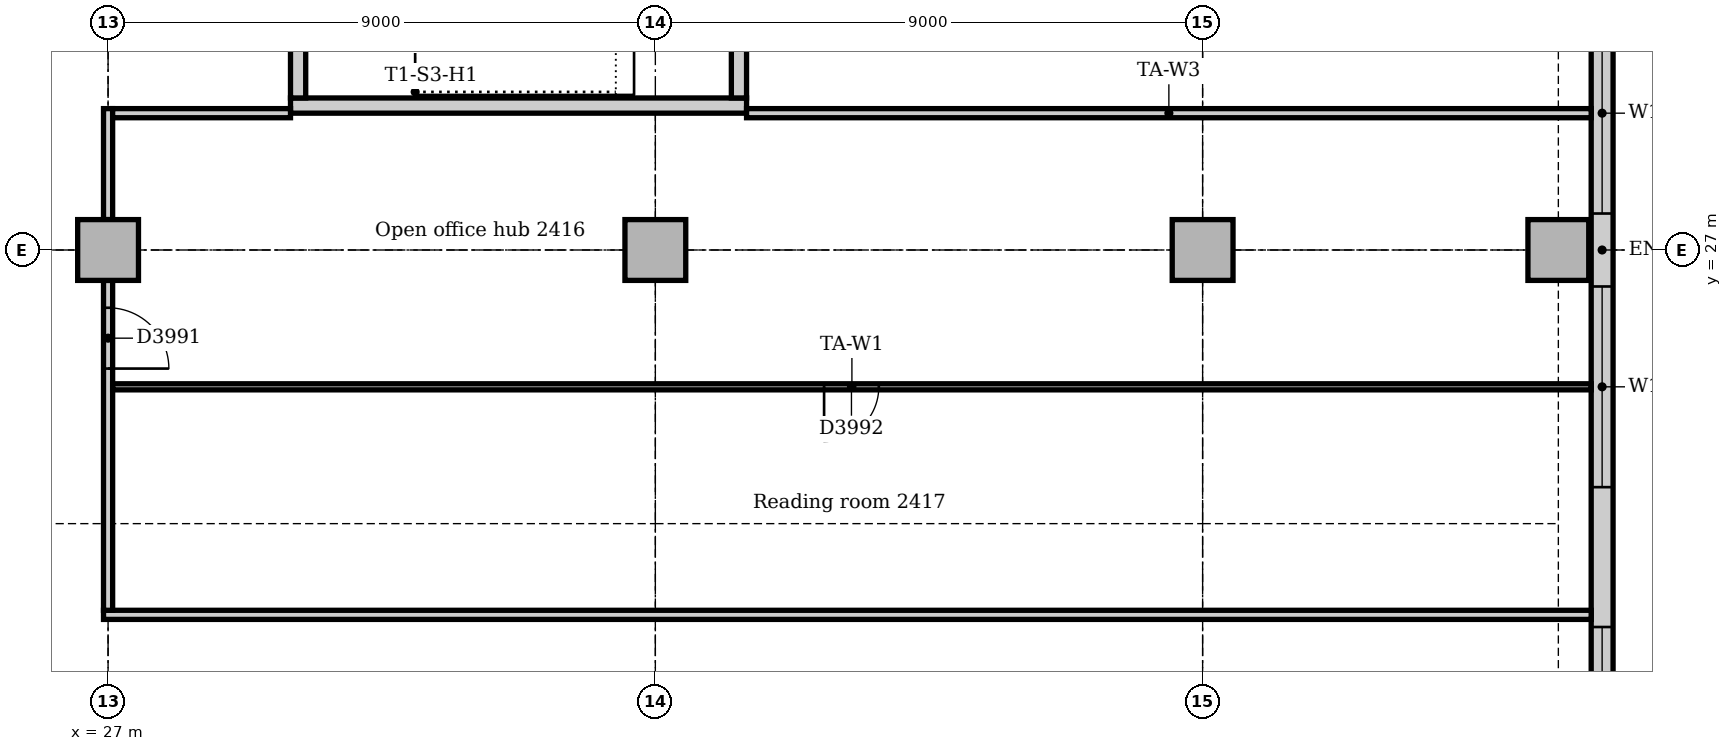
"""IFC4 building model, lengths in metres.
Left out: names, types, materials, properties, quantities, classifications, styles, units other than length and angle.
Written with IfcOpenShell. Run it as: python <this file> out.ifc"""

import sys

from ifc_helpers import new_model, si_unit, direction, frame, frame_2d, origin, origin_2d, place, context, subcontext, project, spatial, rectangle, extrude, element, fill, save


model = new_model("IFC4")
c1 = context("Model", 3, precision=1e-05, world=origin(), true_north=direction((0.0, 1.0)))
c2 = subcontext(c1, "Body", "Model", "MODEL_VIEW")
j1 = project(units=[si_unit("LENGTHUNIT", "METRE"), si_unit("PLANEANGLEUNIT", "RADIAN")], contexts=[c1])
p1 = place(None, origin())
s1 = spatial("IfcSite", under=j1, at=p1, CompositionType="ELEMENT")
p2 = place(p1, origin())
s2 = spatial("IfcBuilding", under=s1, at=p2, CompositionType="ELEMENT")
p3 = place(p2, frame((0.0, 0.0, 104.0)))
s3 = spatial("IfcBuildingStorey", under=s2, at=p3, CompositionType="ELEMENT", Elevation=104.0)
p4 = place(p3, frame((30.0, 29.375, 0.0), z_axis=(0.0, 0.0, 1.0), x_axis=(1.0, 0.0, 0.0)))
e1 = element("IfcWall", 1, at=p4, inside=s3, PredefinedType="SOLIDWALL", context=c2, shape_type="SweptSolid", body=[
    extrude(rectangle(XDim=7.5, YDim=0.25, at=frame_2d((3.75, 0.0))), origin(), (0.0, 0.0, 1.0), 4.0),
])
p5 = place(p3, frame((37.375, 29.5, 0.0), z_axis=(0.0, 0.0, 1.0), x_axis=(0.0, 1.0, 0.0)))
e2 = element("IfcWall", 2, at=p5, inside=s3, PredefinedType="SOLIDWALL", context=c2, shape_type="SweptSolid", body=[
    extrude(rectangle(XDim=4.0, YDim=0.25, at=frame_2d((2.0, 0.0))), origin(), (0.0, 0.0, 1.0), 4.0),
])
p6 = place(p3, frame((30.125, 33.5, 0.0), z_axis=(0.0, 0.0, 1.0), x_axis=(0.0, -1.0, 0.0)))
e3 = element("IfcWall", 3, at=p6, inside=s3, PredefinedType="SOLIDWALL", context=c2, shape_type="SweptSolid", body=[
    extrude(rectangle(XDim=4.0, YDim=0.25, at=frame_2d((2.0, 0.0))), origin(), (0.0, 0.0, 1.0), 4.0),
])
p7 = place(p6, frame((1.5, 0.0, 0.0)))
e4 = element("IfcOpeningElement", 4, at=p7, cuts=e3, PredefinedType="OPENING", context=c2, shape_type="SweptSolid", body=[
    extrude(rectangle(XDim=1.0, YDim=2.1, at=frame_2d((0.5, 1.05))), frame((0.0, 0.135, 0.0), z_axis=(0.0, -1.0, 0.0), x_axis=(1.0, 0.0, 0.0)), (0.0, 0.0, 1.0), 0.27),
])
for number, where, z_axis, x_axis in (
    (5, (50.85, 27.0, 0.0), (0.0, 0.0, 1.0), (1.0, 0.0, 0.0)),
    (6, (27.0, 27.0, 0.0), (0.0, 0.0, 1.0), (1.0, 0.0, 0.0)),
    (7, (36.0, 27.0, 0.0), (0.0, 0.0, 1.0), (1.0, 0.0, 0.0)),
    (8, (45.0, 27.0, 0.0), (0.0, 0.0, 1.0), (1.0, 0.0, 0.0)),
):
    element("IfcColumn", number, at=place(p3, frame(where, z_axis=z_axis, x_axis=x_axis)), inside=s3, PredefinedType="COLUMN", context=c2, shape_type="SweptSolid", body=[
        extrude(rectangle(XDim=1.0, YDim=1.0, at=origin_2d()), origin(), (0.0, 0.0, 1.0), 3.85),
    ])
p8 = place(p3, frame((51.57, 14.743, 0.0), z_axis=(0.0, 0.0, 1.0), x_axis=(0.0, 1.0, 0.0)))
e9 = element("IfcWall", 9, at=p8, inside=s3, PredefinedType="STANDARD", context=c2, shape_type="SweptSolid", body=[
    extrude(rectangle(XDim=24.515, YDim=0.36, at=frame_2d((12.257, 0.0))), origin(), (0.0, 0.0, 1.0), 3.85),
])
p9 = place(p8, frame((4.257, 0.0, 0.9)))
e10 = element("IfcOpeningElement", 10, at=p9, cuts=e9, PredefinedType="OPENING", context=c2, shape_type="SweptSolid", body=[
    extrude(rectangle(XDim=1.8, YDim=1.6, at=frame_2d((0.9, 0.8))), frame((0.0, 0.19, 0.0), z_axis=(0.0, -1.0, 0.0), x_axis=(1.0, 0.0, 0.0)), (0.0, 0.0, 1.0), 0.38),
])
p10 = place(p8, frame((8.357, 0.0, 0.9)))
e11 = element("IfcOpeningElement", 11, at=p10, cuts=e9, PredefinedType="OPENING", context=c2, shape_type="SweptSolid", body=[
    extrude(rectangle(XDim=3.3, YDim=1.6, at=frame_2d((1.65, 0.8))), frame((0.0, 0.19, 0.0), z_axis=(0.0, -1.0, 0.0), x_axis=(1.0, 0.0, 0.0)), (0.0, 0.0, 1.0), 0.38),
])
p11 = place(p8, frame((12.857, 0.0, 0.9)))
e12 = element("IfcOpeningElement", 12, at=p11, cuts=e9, PredefinedType="OPENING", context=c2, shape_type="SweptSolid", body=[
    extrude(rectangle(XDim=3.3, YDim=1.6, at=frame_2d((1.65, 0.8))), frame((0.0, 0.19, 0.0), z_axis=(0.0, -1.0, 0.0), x_axis=(1.0, 0.0, 0.0)), (0.0, 0.0, 1.0), 0.38),
])
p12 = place(p8, frame((17.357, 0.0, 0.9)))
e13 = element("IfcOpeningElement", 13, at=p12, cuts=e9, PredefinedType="OPENING", context=c2, shape_type="SweptSolid", body=[
    extrude(rectangle(XDim=3.3, YDim=1.6, at=frame_2d((1.65, 0.8))), frame((0.0, 0.19, 0.0), z_axis=(0.0, -1.0, 0.0), x_axis=(1.0, 0.0, 0.0)), (0.0, 0.0, 1.0), 0.38),
])
p13 = place(p3, frame((26.925, 21.0, 0.0), z_axis=(0.0, 0.0, 1.0), x_axis=(1.0, 0.0, 0.0)))
e14 = element("IfcWall", 14, at=p13, inside=s3, PredefinedType="PARTITIONING", context=c2, shape_type="SweptSolid", body=[
    extrude(rectangle(XDim=24.465, YDim=0.15, at=frame_2d((12.232, 0.0))), origin(), (0.0, 0.0, 1.0), 3.85),
])
p14 = place(p3, frame((27.0, 21.075, 0.0), z_axis=(0.0, 0.0, 1.0), x_axis=(0.0, 1.0, 0.0)))
e15 = element("IfcWall", 15, at=p14, inside=s3, PredefinedType="PARTITIONING", context=c2, shape_type="SweptSolid", body=[
    extrude(rectangle(XDim=5.425, YDim=0.15, at=frame_2d((2.712, 0.0))), origin(), (0.0, 0.0, 1.0), 3.256),
])
p15 = place(p14, frame((3.975, 0.0, 0.0)))
e16 = element("IfcOpeningElement", 16, at=p15, cuts=e15, PredefinedType="OPENING", context=c2, shape_type="SweptSolid", body=[
    extrude(rectangle(XDim=1.0, YDim=2.1, at=frame_2d((0.5, 1.05))), frame((0.0, 0.085, 0.0), z_axis=(0.0, -1.0, 0.0), x_axis=(1.0, 0.0, 0.0)), (0.0, 0.0, 1.0), 0.17),
])
p16 = place(p3, frame((27.0, 27.5, 0.0), z_axis=(0.0, 0.0, 1.0), x_axis=(0.0, 1.0, 0.0)))
e17 = element("IfcWall", 17, at=p16, inside=s3, PredefinedType="PARTITIONING", context=c2, shape_type="SweptSolid", body=[
    extrude(rectangle(XDim=1.825, YDim=0.15, at=frame_2d((0.912, 0.0))), origin(), (0.0, 0.0, 1.0), 3.256),
])
p17 = place(p3, frame((27.075, 29.25, 0.0), z_axis=(0.0, 0.0, 1.0), x_axis=(1.0, 0.0, 0.0)))
e18 = element("IfcWall", 18, at=p17, inside=s3, PredefinedType="PARTITIONING", context=c2, shape_type="SweptSolid", body=[
    extrude(rectangle(XDim=2.925, YDim=0.15, at=frame_2d((1.462, 0.0))), origin(), (0.0, 0.0, 1.0), 3.85),
])
p18 = place(p3, frame((37.5, 29.25, 0.0), z_axis=(0.0, 0.0, 1.0), x_axis=(1.0, 0.0, 0.0)))
e19 = element("IfcWall", 19, at=p18, inside=s3, PredefinedType="PARTITIONING", context=c2, shape_type="SweptSolid", body=[
    extrude(rectangle(XDim=13.89, YDim=0.15, at=frame_2d((6.945, 0.0))), origin(), (0.0, 0.0, 1.0), 3.85),
])
p19 = place(p3, frame((27.075, 24.75, 0.0), z_axis=(0.0, 0.0, 1.0), x_axis=(1.0, 0.0, 0.0)))
e20 = element("IfcWall", 20, at=p19, inside=s3, PredefinedType="PARTITIONING", context=c2, shape_type="SweptSolid", body=[
    extrude(rectangle(XDim=24.315, YDim=0.1, at=frame_2d((12.158, 0.0))), origin(), (0.0, 0.0, 1.0), 3.85),
])
p20 = place(p19, frame((11.7, 0.0, 0.0)))
e21 = element("IfcOpeningElement", 21, at=p20, cuts=e20, PredefinedType="OPENING", context=c2, shape_type="SweptSolid", body=[
    extrude(rectangle(XDim=0.9, YDim=2.1, at=frame_2d((0.45, 1.05))), frame((0.0, 0.06, 0.0), z_axis=(0.0, -1.0, 0.0), x_axis=(1.0, 0.0, 0.0)), (0.0, 0.0, 1.0), 0.12),
])
p21 = place(p9, origin())
e22 = element("IfcWindow", 22, at=p21, inside=s3, PartitioningType="SINGLE_PANEL", PredefinedType="WINDOW", context=c2, shape_type="SweptSolid", body=[
    extrude(rectangle(XDim=1.8, YDim=1.6, at=frame_2d((0.9, 0.8))), frame((0.0, 0.13, 0.0), z_axis=(0.0, -1.0, 0.0), x_axis=(1.0, 0.0, 0.0)), (0.0, 0.0, 1.0), 0.06),
])
fill(e10, e22)
p22 = place(p10, origin())
e23 = element("IfcWindow", 23, at=p22, inside=s3, PartitioningType="SINGLE_PANEL", PredefinedType="WINDOW", context=c2, shape_type="SweptSolid", body=[
    extrude(rectangle(XDim=3.3, YDim=1.6, at=frame_2d((1.65, 0.8))), frame((0.0, 0.13, 0.0), z_axis=(0.0, -1.0, 0.0), x_axis=(1.0, 0.0, 0.0)), (0.0, 0.0, 1.0), 0.06),
])
fill(e11, e23)
p23 = place(p11, origin())
e24 = element("IfcWindow", 24, at=p23, inside=s3, PartitioningType="SINGLE_PANEL", PredefinedType="WINDOW", context=c2, shape_type="SweptSolid", body=[
    extrude(rectangle(XDim=3.3, YDim=1.6, at=frame_2d((1.65, 0.8))), frame((0.0, 0.13, 0.0), z_axis=(0.0, -1.0, 0.0), x_axis=(1.0, 0.0, 0.0)), (0.0, 0.0, 1.0), 0.06),
])
fill(e12, e24)
p24 = place(p15, frame((1.0, 0.0, 0.0), z_axis=(0.0, 0.0, 1.0), x_axis=(-1.0, 0.0, 0.0)))
e25 = element("IfcDoor", 25, at=p24, inside=s3, OperationType="SINGLE_SWING_RIGHT", PredefinedType="DOOR", context=c2, shape_type="SweptSolid", body=[
    extrude(rectangle(XDim=1.0, YDim=2.1, at=frame_2d((0.5, 1.05))), frame((0.0, 0.025, 0.0), z_axis=(0.0, -1.0, 0.0), x_axis=(1.0, 0.0, 0.0)), (0.0, 0.0, 1.0), 0.05),
])
fill(e16, e25)
p25 = place(p20, frame((0.9, 0.0, 0.0), z_axis=(0.0, 0.0, 1.0), x_axis=(-1.0, 0.0, 0.0)))
e26 = element("IfcDoor", 26, at=p25, inside=s3, OperationType="SINGLE_SWING_RIGHT", PredefinedType="DOOR", context=c2, shape_type="SweptSolid", body=[
    extrude(rectangle(XDim=0.9, YDim=2.1, at=frame_2d((0.45, 1.05))), frame((0.0, 0.025, 0.0), z_axis=(0.0, -1.0, 0.0), x_axis=(1.0, 0.0, 0.0)), (0.0, 0.0, 1.0), 0.05),
])
fill(e21, e26)
save(model, sys.argv[1])
